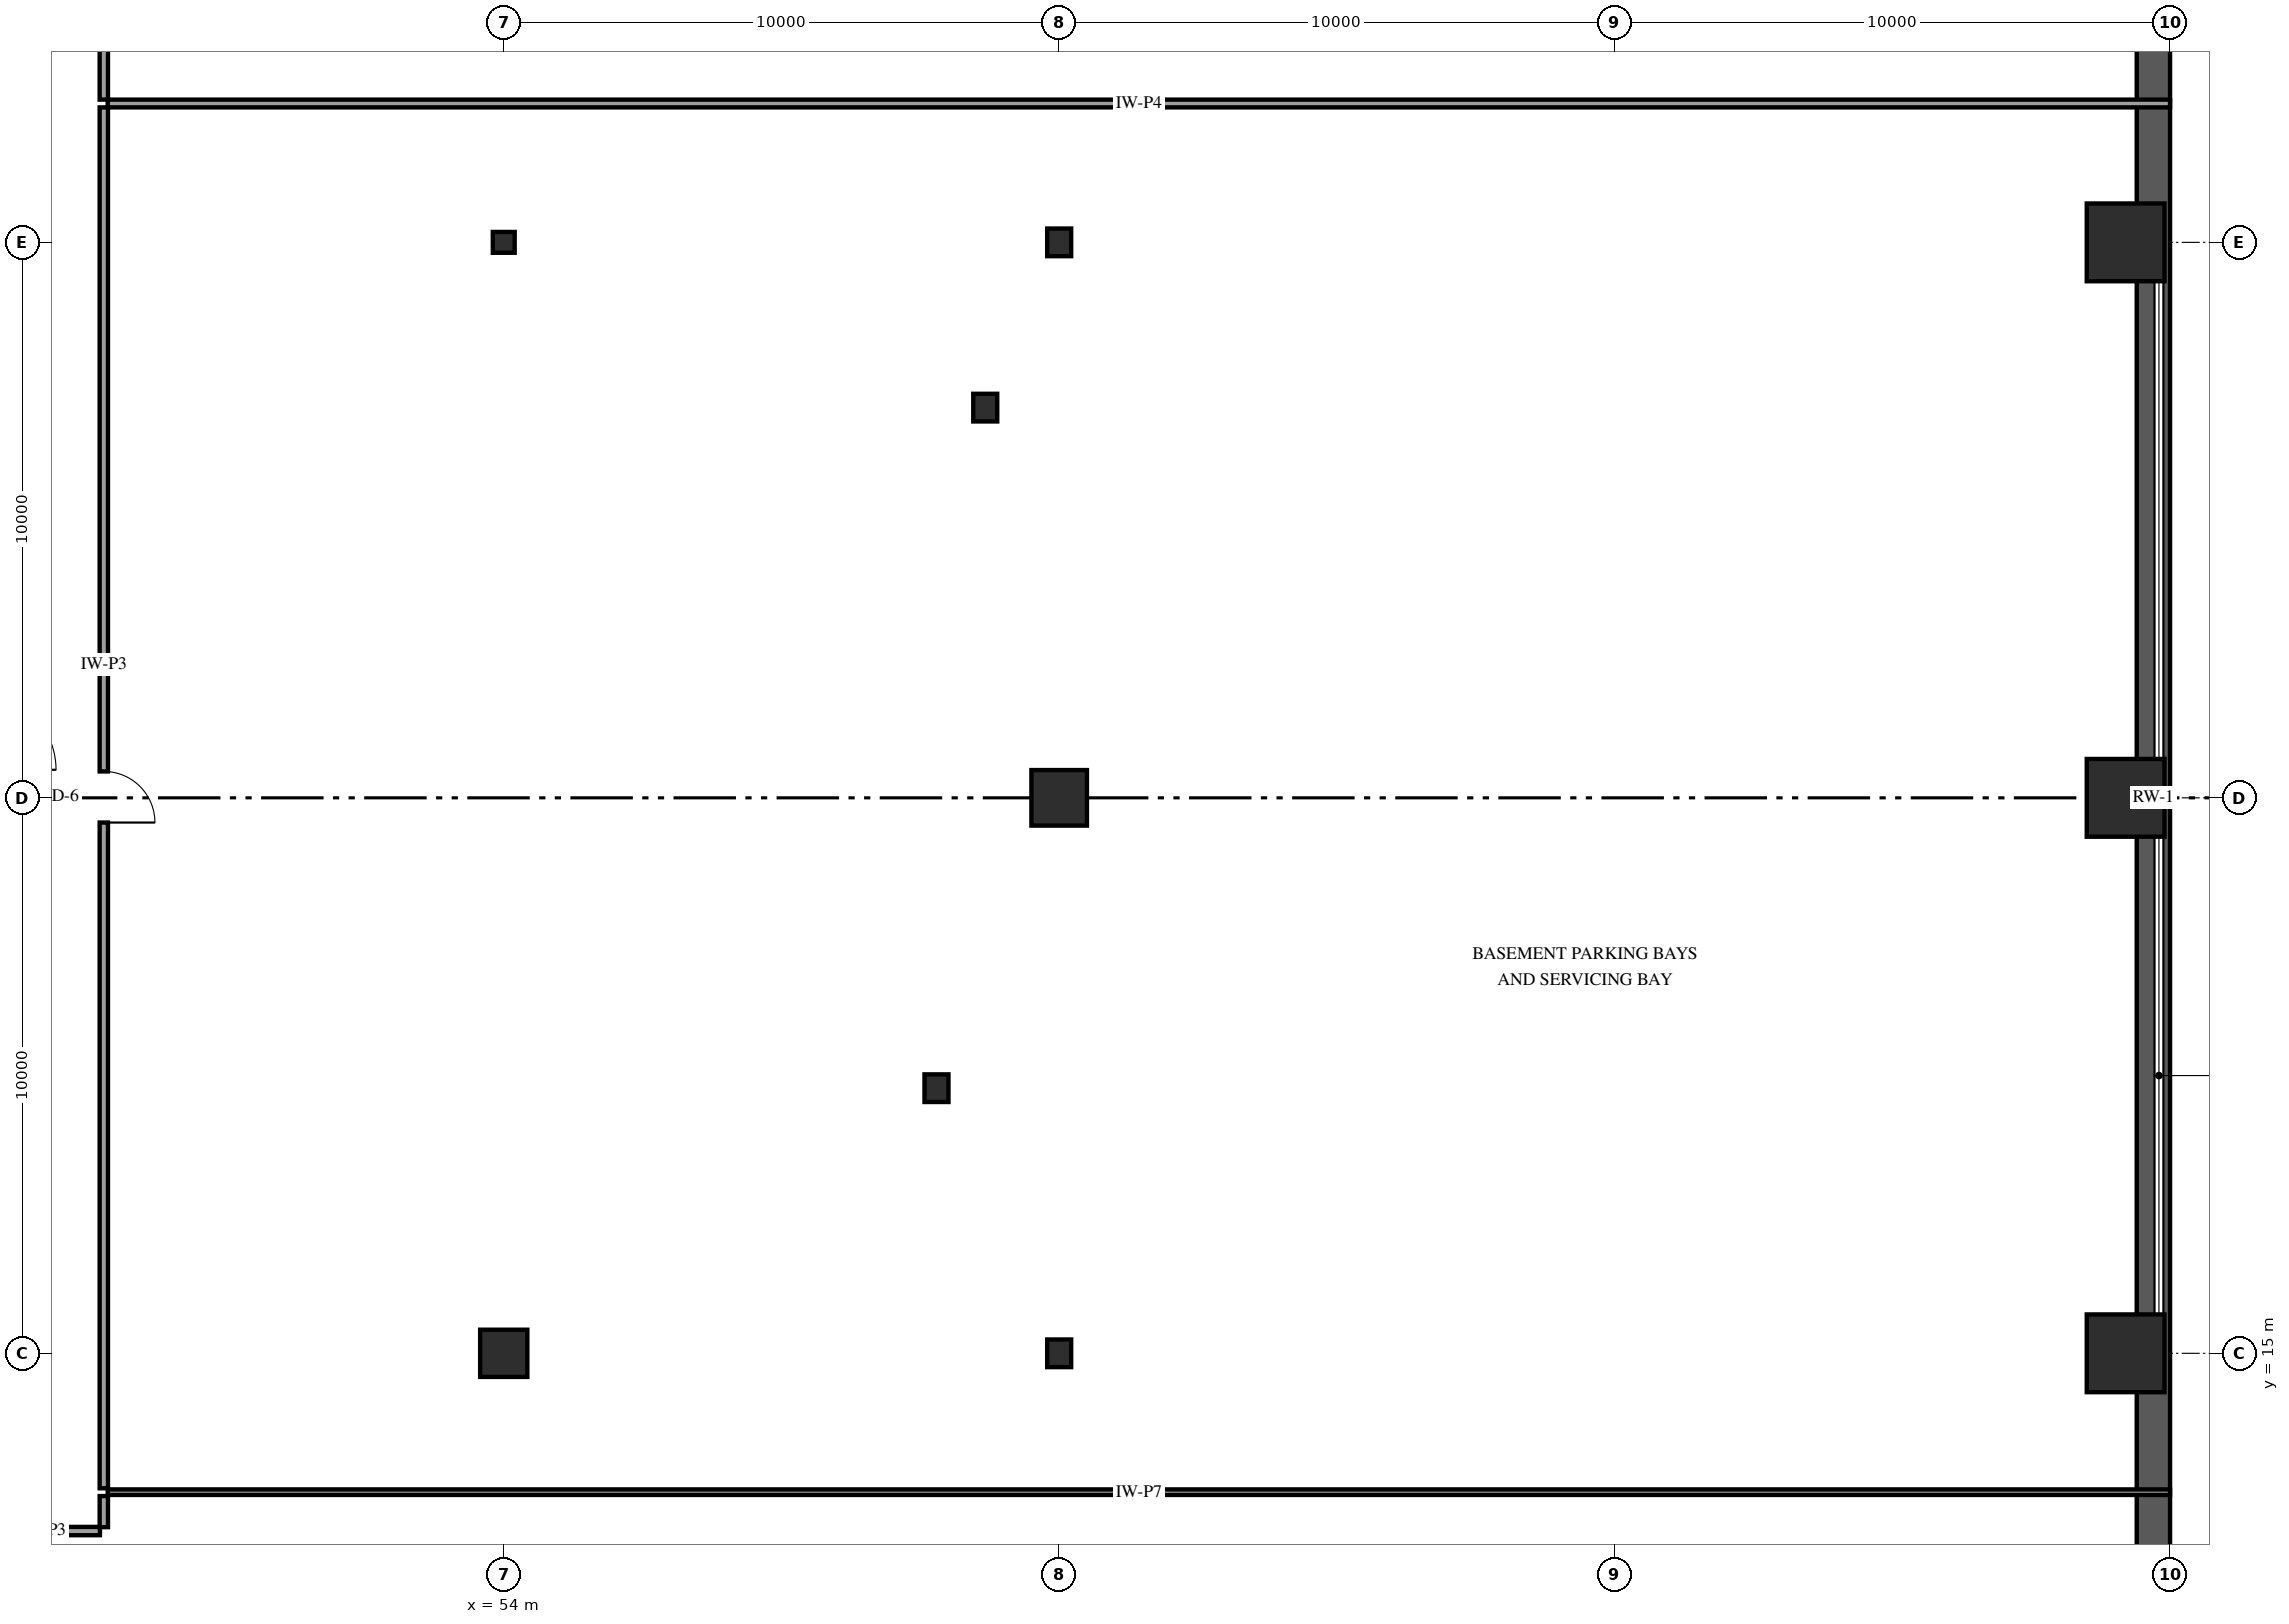
"""IFC4 building model, lengths in metres.
Left out: names, types, materials, properties, quantities, classifications, styles, units other than length and angle.
Written with IfcOpenShell. Run it as: python <this file> out.ifc"""

import sys

from ifc_helpers import new_model, si_unit, direction, frame, frame_2d, origin, origin_2d, place, context, subcontext, project, spatial, rectangle, i_section, extrude, element, fill, save


model = new_model("IFC4")
c1 = context("Model", 3, precision=1e-05, world=origin(), true_north=direction((0.0, 1.0)))
c2 = subcontext(c1, "Body", "Model", "MODEL_VIEW")
j1 = project(units=[si_unit("LENGTHUNIT", "METRE"), si_unit("PLANEANGLEUNIT", "RADIAN")], contexts=[c1])
p1 = place(None, origin())
s1 = spatial("IfcSite", under=j1, at=p1, CompositionType="ELEMENT")
p2 = place(p1, origin())
s2 = spatial("IfcBuilding", under=s1, at=p2, CompositionType="ELEMENT")
p3 = place(p2, frame((0.0, 0.0, -5.4)))
s3 = spatial("IfcBuildingStorey", under=s2, at=p3, CompositionType="ELEMENT", Elevation=-5.4)
p4 = place(p3, frame((83.7, 2.3, 0.0), z_axis=(0.0, 0.0, 1.0), x_axis=(0.0, 1.0, 0.0)))
e1 = element("IfcWall", 1, at=p4, inside=s3, PredefinedType="USERDEFINED", context=c2, shape_type="SweptSolid", body=[
    extrude(rectangle(XDim=45.4, YDim=0.6, at=frame_2d((22.7, 0.0))), origin(), (0.0, 0.0, 1.0), 5.4),
])
p5 = place(p3, frame((64.0, 15.0, 0.0), z_axis=(0.0, 0.0, 1.0), x_axis=(1.0, 0.0, 0.0)))
e2 = element("IfcColumn", 2, at=p5, inside=s3, PredefinedType="COLUMN", context=c2, shape_type="SweptSolid", body=[
    extrude(i_section(OverallWidth=0.432, OverallDepth=0.498, WebThickness=0.056, FlangeThickness=0.089, FilletRadius=0.038, at=origin_2d()), origin(), (0.0, 0.0, 1.0), 5.4),
])
p6 = place(p3, frame((83.2, 15.0, 0.0), z_axis=(0.0, 0.0, 1.0), x_axis=(1.0, 0.0, 0.0)))
e3 = element("IfcColumn", 3, at=p6, inside=s3, PredefinedType="COLUMN", context=c2, shape_type="SweptSolid", body=[
    extrude(rectangle(XDim=1.4, YDim=1.4, at=origin_2d()), origin(), (0.0, 0.0, 1.0), 5.4),
])
p7 = place(p3, frame((64.0, 35.0, 0.0), z_axis=(0.0, 0.0, 1.0), x_axis=(1.0, 0.0, 0.0)))
e4 = element("IfcColumn", 4, at=p7, inside=s3, PredefinedType="COLUMN", context=c2, shape_type="SweptSolid", body=[
    extrude(i_section(OverallWidth=0.432, OverallDepth=0.498, WebThickness=0.056, FlangeThickness=0.089, FilletRadius=0.038, at=origin_2d()), origin(), (0.0, 0.0, 1.0), 5.4),
])
p8 = place(p3, frame((83.2, 35.0, 0.0), z_axis=(0.0, 0.0, 1.0), x_axis=(1.0, 0.0, 0.0)))
e5 = element("IfcColumn", 5, at=p8, inside=s3, PredefinedType="COLUMN", context=c2, shape_type="SweptSolid", body=[
    extrude(rectangle(XDim=1.4, YDim=1.4, at=origin_2d()), origin(), (0.0, 0.0, 1.0), 5.4),
])
p9 = place(p3, frame((64.0, 25.0, 0.0), z_axis=(0.0, 0.0, 1.0), x_axis=(1.0, 0.0, 0.0)))
e6 = element("IfcColumn", 6, at=p9, inside=s3, PredefinedType="COLUMN", context=c2, shape_type="SweptSolid", body=[
    extrude(rectangle(XDim=1.0, YDim=1.0, at=origin_2d()), origin(), (0.0, 0.0, 1.0), 5.4),
])
p10 = place(p3, frame((83.2, 25.0, 0.0), z_axis=(0.0, 0.0, 1.0), x_axis=(1.0, 0.0, 0.0)))
e7 = element("IfcColumn", 7, at=p10, inside=s3, PredefinedType="COLUMN", context=c2, shape_type="SweptSolid", body=[
    extrude(rectangle(XDim=1.4, YDim=1.4, at=origin_2d()), origin(), (0.0, 0.0, 1.0), 5.4),
])
p11 = place(p3, frame((54.0, 15.0, 0.0), z_axis=(0.0, 0.0, 1.0), x_axis=(1.0, 0.0, 0.0)))
e8 = element("IfcColumn", 8, at=p11, inside=s3, PredefinedType="COLUMN", context=c2, shape_type="SweptSolid", body=[
    extrude(rectangle(XDim=0.85, YDim=0.85, at=origin_2d()), origin(), (0.0, 0.0, 1.0), 5.4),
])
p12 = place(p3, frame((54.0, 35.0, 0.0), z_axis=(0.0, 0.0, 1.0), x_axis=(1.0, 0.0, 0.0)))
e9 = element("IfcColumn", 9, at=p12, inside=s3, PredefinedType="COLUMN", context=c2, shape_type="SweptSolid", body=[
    extrude(i_section(OverallWidth=0.394, OverallDepth=0.375, WebThickness=0.017, FlangeThickness=0.028, FilletRadius=0.038, at=origin_2d()), origin(), (0.0, 0.0, 1.0), 5.4),
])
for number, where, z_axis, x_axis in (
    (10, (62.669, 32.025, 0.0), (0.0, 0.0, 1.0), (1.0, 0.0, 0.0)),
    (11, (61.791, 19.773, 0.0), (0.0, 0.0, 1.0), (1.0, 0.0, 0.0)),
):
    element("IfcColumn", number, at=place(p3, frame(where, z_axis=z_axis, x_axis=x_axis)), inside=s3, PredefinedType="COLUMN", context=c2, shape_type="SweptSolid", body=[
        extrude(i_section(OverallWidth=0.432, OverallDepth=0.498, WebThickness=0.056, FlangeThickness=0.089, FilletRadius=0.038, at=origin_2d()), origin(), (0.0, 0.0, 1.0), 5.4),
    ])
p13 = place(p3, frame((46.87, 12.5, 0.0), z_axis=(0.0, 0.0, 1.0), x_axis=(1.0, 0.0, 0.0)))
e12 = element("IfcWall", 12, at=p13, inside=s3, PredefinedType="PARTITIONING", context=c2, shape_type="SweptSolid", body=[
    extrude(rectangle(XDim=37.13, YDim=0.1, at=frame_2d((18.565, 0.0))), origin(), (0.0, 0.0, 1.0), 5.08),
])
p14 = place(p3, frame((46.87, 37.5, 0.0), z_axis=(0.0, 0.0, 1.0), x_axis=(1.0, 0.0, 0.0)))
e13 = element("IfcWall", 13, at=p14, inside=s3, PredefinedType="PARTITIONING", context=c2, shape_type="SweptSolid", body=[
    extrude(rectangle(XDim=37.13, YDim=0.14, at=frame_2d((18.565, 0.0))), origin(), (0.0, 0.0, 1.0), 5.08),
])
p15 = place(p3, frame((46.8, 37.43, 0.0), z_axis=(0.0, 0.0, 1.0), x_axis=(0.0, -1.0, 0.0)))
e14 = element("IfcWall", 14, at=p15, inside=s3, PredefinedType="PARTITIONING", context=c2, shape_type="SweptSolid", body=[
    extrude(rectangle(XDim=24.86, YDim=0.15, at=frame_2d((12.43, 0.0))), origin(), (0.0, 0.0, 1.0), 5.08),
])
p16 = place(p15, frame((11.955, 0.0, 0.0)))
e15 = element("IfcOpeningElement", 15, at=p16, cuts=e14, PredefinedType="OPENING", context=c2, shape_type="SweptSolid", body=[
    extrude(rectangle(XDim=0.92, YDim=2.12, at=frame_2d((0.46, 1.06))), frame((0.0, 0.085, 0.0), z_axis=(0.0, -1.0, 0.0), x_axis=(1.0, 0.0, 0.0)), (0.0, 0.0, 1.0), 0.17),
])
p17 = place(p3, frame((46.8, 42.93, 0.0), z_axis=(0.0, 0.0, 1.0), x_axis=(0.0, -1.0, 0.0)))
e16 = element("IfcWall", 16, at=p17, inside=s3, PredefinedType="PARTITIONING", context=c2, shape_type="SweptSolid", body=[
    extrude(rectangle(XDim=5.36, YDim=0.15, at=frame_2d((2.68, 0.0))), origin(), (0.0, 0.0, 1.0), 5.08),
])
p18 = place(p3, frame((46.73, 11.8, 0.0), z_axis=(0.0, 0.0, 1.0), x_axis=(-1.0, 0.0, 0.0)))
e17 = element("IfcWall", 17, at=p18, inside=s3, PredefinedType="PARTITIONING", context=c2, shape_type="SweptSolid", body=[
    extrude(rectangle(XDim=2.06, YDim=0.15, at=frame_2d((1.03, 0.0))), origin(), (0.0, 0.0, 1.0), 5.08),
])
p19 = place(p3, frame((46.8, 12.43, 0.0), z_axis=(0.0, 0.0, 1.0), x_axis=(0.0, -1.0, 0.0)))
e18 = element("IfcWall", 18, at=p19, inside=s3, PredefinedType="PARTITIONING", context=c2, shape_type="SweptSolid", body=[
    extrude(rectangle(XDim=0.56, YDim=0.15, at=frame_2d((0.28, 0.0))), origin(), (0.0, 0.0, 1.0), 5.08),
])
p20 = place(p16, origin())
e19 = element("IfcDoor", 19, at=p20, inside=s3, OperationType="SINGLE_SWING_RIGHT", PredefinedType="DOOR", context=c2, shape_type="SweptSolid", body=[
    extrude(rectangle(XDim=0.92, YDim=2.12, at=frame_2d((0.46, 1.06))), frame((0.0, 0.025, 0.0), z_axis=(0.0, -1.0, 0.0), x_axis=(1.0, 0.0, 0.0)), (0.0, 0.0, 1.0), 0.05),
])
fill(e15, e19)
save(model, sys.argv[1])
